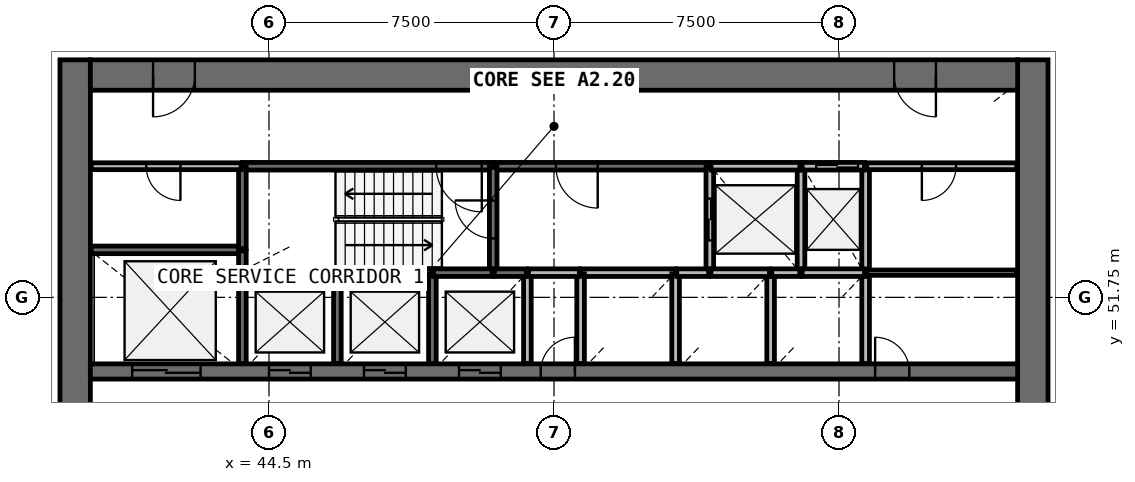
"""IFC4 building model, lengths in metres.
Left out: names, types, materials, properties, quantities, classifications, styles, units other than length and angle.
Written with IfcOpenShell. Run it as: python <this file> out.ifc"""

import sys

from ifc_helpers import new_model, si_unit, direction, frame, frame_2d, origin, place, context, subcontext, project, spatial, rectangle, extrude, source, transform, mapped, element, fill, save


model = new_model("IFC4")
c1 = context("Model", 3, precision=1e-05, world=origin(), true_north=direction((0.0, 1.0)))
c2 = subcontext(c1, "Body", "Model", "MODEL_VIEW")
j1 = project(units=[si_unit("LENGTHUNIT", "METRE"), si_unit("PLANEANGLEUNIT", "RADIAN")], contexts=[c1])
p1 = place(None, origin())
s1 = spatial("IfcSite", under=j1, at=p1, CompositionType="ELEMENT")
p2 = place(p1, origin())
s2 = spatial("IfcBuilding", under=s1, at=p2, CompositionType="ELEMENT")
p3 = place(p2, frame((0.0, 0.0, 83.9)))
s3 = spatial("IfcBuildingStorey", under=s2, at=p3, CompositionType="ELEMENT", Elevation=83.9)
p4 = place(p3, frame((64.6, 38.0, 0.0), z_axis=(0.0, 0.0, 1.0), x_axis=(0.0, 1.0, 0.0)))
e1 = element("IfcWall", 1, at=p4, inside=s3, PredefinedType="SHEAR", context=c2, shape_type="SweptSolid", body=[
    extrude(rectangle(XDim=20.0, YDim=0.8, at=frame_2d((10.0, 0.0))), origin(), (0.0, 0.0, 1.0), 4.1),
])
p5 = place(p4, frame((9.1, 0.0, 0.0)))
e2 = element("IfcOpeningElement", 2, at=p5, cuts=e1, PredefinedType="OPENING", context=c2, shape_type="SweptSolid", body=[
    extrude(rectangle(XDim=1.8, YDim=2.1, at=frame_2d((0.9, 1.05))), frame((0.0, 0.41, 0.0), z_axis=(0.0, -1.0, 0.0), x_axis=(1.0, 0.0, 0.0)), (0.0, 0.0, 1.0), 0.82),
])
p6 = place(p3, frame((39.4, 58.0, 0.0), z_axis=(0.0, 0.0, 1.0), x_axis=(0.0, -1.0, 0.0)))
e3 = element("IfcWall", 3, at=p6, inside=s3, PredefinedType="SHEAR", context=c2, shape_type="SweptSolid", body=[
    extrude(rectangle(XDim=20.0, YDim=0.8, at=frame_2d((10.0, 0.0))), origin(), (0.0, 0.0, 1.0), 4.1),
])
p7 = place(p6, frame((9.1, 0.0, 0.0)))
e4 = element("IfcOpeningElement", 4, at=p7, cuts=e3, PredefinedType="OPENING", context=c2, shape_type="SweptSolid", body=[
    extrude(rectangle(XDim=1.8, YDim=2.1, at=frame_2d((0.9, 1.05))), frame((0.0, 0.41, 0.0), z_axis=(0.0, -1.0, 0.0), x_axis=(1.0, 0.0, 0.0)), (0.0, 0.0, 1.0), 0.82),
])
p8 = place(p3, frame((64.2, 57.6, 0.0), z_axis=(0.0, 0.0, 1.0), x_axis=(-1.0, 0.0, 0.0)))
e5 = element("IfcWall", 5, at=p8, inside=s3, PredefinedType="SHEAR", context=c2, shape_type="SweptSolid", body=[
    extrude(rectangle(XDim=24.4, YDim=0.8, at=frame_2d((12.2, 0.0))), origin(), (0.0, 0.0, 1.0), 4.1),
])
p9 = place(p8, frame((21.65, 0.0, 0.0)))
e6 = element("IfcOpeningElement", 6, at=p9, cuts=e5, PredefinedType="OPENING", context=c2, shape_type="SweptSolid", body=[
    extrude(rectangle(XDim=1.1, YDim=2.1, at=frame_2d((0.55, 1.05))), frame((0.0, 0.41, 0.0), z_axis=(0.0, -1.0, 0.0), x_axis=(1.0, 0.0, 0.0)), (0.0, 0.0, 1.0), 0.82),
])
p10 = place(p8, frame((2.15, 0.0, 0.0)))
e7 = element("IfcOpeningElement", 7, at=p10, cuts=e5, PredefinedType="OPENING", context=c2, shape_type="SweptSolid", body=[
    extrude(rectangle(XDim=1.1, YDim=2.1, at=frame_2d((0.55, 1.05))), frame((0.0, 0.41, 0.0), z_axis=(0.0, -1.0, 0.0), x_axis=(1.0, 0.0, 0.0)), (0.0, 0.0, 1.0), 0.82),
])
p11 = place(p3, frame((39.8, 49.8, 0.0), z_axis=(0.0, 0.0, 1.0), x_axis=(1.0, 0.0, 0.0)))
e8 = element("IfcWall", 8, at=p11, inside=s3, PredefinedType="SHEAR", context=c2, shape_type="SweptSolid", body=[
    extrude(rectangle(XDim=24.4, YDim=0.4, at=frame_2d((12.2, 0.0))), origin(), (0.0, 0.0, 1.0), 4.1),
])
p12 = place(p11, frame((4.7, 0.0, 0.0)))
e9 = element("IfcOpeningElement", 9, at=p12, cuts=e8, PredefinedType="OPENING", context=c2, shape_type="SweptSolid", body=[
    extrude(rectangle(XDim=1.1, YDim=2.1, at=frame_2d((0.55, 1.05))), frame((0.0, 0.21, 0.0), z_axis=(0.0, -1.0, 0.0), x_axis=(1.0, 0.0, 0.0)), (0.0, 0.0, 1.0), 0.42),
])
p13 = place(p11, frame((7.2, 0.0, 0.0)))
e10 = element("IfcOpeningElement", 10, at=p13, cuts=e8, PredefinedType="OPENING", context=c2, shape_type="SweptSolid", body=[
    extrude(rectangle(XDim=1.1, YDim=2.1, at=frame_2d((0.55, 1.05))), frame((0.0, 0.21, 0.0), z_axis=(0.0, -1.0, 0.0), x_axis=(1.0, 0.0, 0.0)), (0.0, 0.0, 1.0), 0.42),
])
p14 = place(p11, frame((9.7, 0.0, 0.0)))
e11 = element("IfcOpeningElement", 11, at=p14, cuts=e8, PredefinedType="OPENING", context=c2, shape_type="SweptSolid", body=[
    extrude(rectangle(XDim=1.1, YDim=2.1, at=frame_2d((0.55, 1.05))), frame((0.0, 0.21, 0.0), z_axis=(0.0, -1.0, 0.0), x_axis=(1.0, 0.0, 0.0)), (0.0, 0.0, 1.0), 0.42),
])
p15 = place(p11, frame((1.1, 0.0, 0.0)))
e12 = element("IfcOpeningElement", 12, at=p15, cuts=e8, PredefinedType="OPENING", context=c2, shape_type="SweptSolid", body=[
    extrude(rectangle(XDim=1.8, YDim=2.4, at=frame_2d((0.9, 1.2))), frame((0.0, 0.21, 0.0), z_axis=(0.0, -1.0, 0.0), x_axis=(1.0, 0.0, 0.0)), (0.0, 0.0, 1.0), 0.42),
])
p16 = place(p11, frame((20.65, 0.0, 0.0)))
e13 = element("IfcOpeningElement", 13, at=p16, cuts=e8, PredefinedType="OPENING", context=c2, shape_type="SweptSolid", body=[
    extrude(rectangle(XDim=0.9, YDim=2.1, at=frame_2d((0.45, 1.05))), frame((0.0, 0.21, 0.0), z_axis=(0.0, -1.0, 0.0), x_axis=(1.0, 0.0, 0.0)), (0.0, 0.0, 1.0), 0.42),
])
p17 = place(p11, frame((11.85, 0.0, 0.0)))
e14 = element("IfcOpeningElement", 14, at=p17, cuts=e8, PredefinedType="OPENING", context=c2, shape_type="SweptSolid", body=[
    extrude(rectangle(XDim=0.9, YDim=2.1, at=frame_2d((0.45, 1.05))), frame((0.0, 0.21, 0.0), z_axis=(0.0, -1.0, 0.0), x_axis=(1.0, 0.0, 0.0)), (0.0, 0.0, 1.0), 0.42),
])
p18 = place(p3, frame((50.4, 55.2, 0.0), z_axis=(0.0, 0.0, 1.0), x_axis=(-1.0, 0.0, 0.0)))
e15 = element("IfcWall", 15, at=p18, inside=s3, PredefinedType="SOLIDWALL", context=c2, shape_type="SweptSolid", body=[
    extrude(rectangle(XDim=6.6, YDim=0.2, at=frame_2d((3.3, 0.0))), origin(), (0.0, 0.0, 1.0), 3.7),
])
p19 = place(p18, frame((0.3, 0.0, 0.0)))
e16 = element("IfcOpeningElement", 16, at=p19, cuts=e15, PredefinedType="OPENING", context=c2, shape_type="SweptSolid", body=[
    extrude(rectangle(XDim=1.2, YDim=2.1, at=frame_2d((0.6, 1.05))), frame((0.0, 0.11, 0.0), z_axis=(0.0, -1.0, 0.0), x_axis=(1.0, 0.0, 0.0)), (0.0, 0.0, 1.0), 0.22),
])
p20 = place(p3, frame((56.1, 55.2, 0.0), z_axis=(0.0, 0.0, 1.0), x_axis=(-1.0, 0.0, 0.0)))
e17 = element("IfcWall", 17, at=p20, inside=s3, PredefinedType="SOLIDWALL", context=c2, shape_type="SweptSolid", body=[
    extrude(rectangle(XDim=5.67, YDim=0.2, at=frame_2d((2.835, 0.0))), origin(), (0.0, 0.0, 1.0), 3.7),
])
p21 = place(p20, frame((2.95, 0.0, 0.0)))
e18 = element("IfcOpeningElement", 18, at=p21, cuts=e17, PredefinedType="OPENING", context=c2, shape_type="SweptSolid", body=[
    extrude(rectangle(XDim=1.1, YDim=2.1, at=frame_2d((0.55, 1.05))), frame((0.0, 0.11, 0.0), z_axis=(0.0, -1.0, 0.0), x_axis=(1.0, 0.0, 0.0)), (0.0, 0.0, 1.0), 0.22),
])
p22 = place(p3, frame((43.8, 53.0, 0.0), z_axis=(0.0, 0.0, 1.0), x_axis=(-1.0, 0.0, 0.0)))
e19 = element("IfcWall", 19, at=p22, inside=s3, PredefinedType="SOLIDWALL", context=c2, shape_type="SweptSolid", body=[
    extrude(rectangle(XDim=3.98, YDim=0.2, at=frame_2d((1.99, 0.0))), origin(), (0.0, 0.0, 1.0), 3.7),
])
p23 = place(p3, frame((50.4, 52.4, 0.0), z_axis=(0.0, 0.0, 1.0), x_axis=(0.0, 1.0, 0.0)))
e20 = element("IfcWall", 20, at=p23, inside=s3, PredefinedType="SOLIDWALL", context=c2, shape_type="SweptSolid", body=[
    extrude(rectangle(XDim=2.77, YDim=0.2, at=frame_2d((1.385, 0.0))), origin(), (0.0, 0.0, 1.0), 3.7),
])
p24 = place(p23, frame((0.9, 0.0, 0.0)))
e21 = element("IfcOpeningElement", 21, at=p24, cuts=e20, PredefinedType="OPENING", context=c2, shape_type="SweptSolid", body=[
    extrude(rectangle(XDim=1.0, YDim=2.1, at=frame_2d((0.5, 1.05))), frame((0.0, 0.11, 0.0), z_axis=(0.0, -1.0, 0.0), x_axis=(1.0, 0.0, 0.0)), (0.0, 0.0, 1.0), 0.22),
])
p25 = place(p3, frame((56.1, 55.17, 0.0), z_axis=(0.0, 0.0, 1.0), x_axis=(0.0, -1.0, 0.0)))
e22 = element("IfcWall", 22, at=p25, inside=s3, PredefinedType="SOLIDWALL", context=c2, shape_type="SweptSolid", body=[
    extrude(rectangle(XDim=2.77, YDim=0.2, at=frame_2d((1.385, 0.0))), origin(), (0.0, 0.0, 1.0), 3.7),
])
p26 = place(p25, frame((0.82, 0.0, 0.0)))
e23 = element("IfcOpeningElement", 23, at=p26, cuts=e22, PredefinedType="OPENING", context=c2, shape_type="SweptSolid", body=[
    extrude(rectangle(XDim=1.1, YDim=2.1, at=frame_2d((0.55, 1.05))), frame((0.0, 0.11, 0.0), z_axis=(0.0, -1.0, 0.0), x_axis=(1.0, 0.0, 0.0)), (0.0, 0.0, 1.0), 0.22),
])
for number, where, z_axis, x_axis in (
    (24, (58.5, 52.4, 0.0), (0.0, 0.0, 1.0), (0.0, 1.0, 0.0)),
    (25, (60.2, 52.4, 0.0), (0.0, 0.0, 1.0), (0.0, 1.0, 0.0)),
):
    element("IfcWall", number, at=place(p3, frame(where, z_axis=z_axis, x_axis=x_axis)), inside=s3, PredefinedType="SOLIDWALL", context=c2, shape_type="SweptSolid", body=[
        extrude(rectangle(XDim=2.8, YDim=0.2, at=frame_2d((1.4, 0.0))), origin(), (0.0, 0.0, 1.0), 3.7),
    ])
p27 = place(p3, frame((46.3, 52.4, 0.0), z_axis=(0.0, 0.0, 1.0), x_axis=(-1.0, 0.0, 0.0)))
e26 = element("IfcWall", 26, at=p27, inside=s3, PredefinedType="SOLIDWALL", context=c2, shape_type="SweptSolid", body=[
    extrude(rectangle(XDim=2.5, YDim=0.2, at=frame_2d((1.25, 0.0))), origin(), (0.0, 0.0, 1.0), 3.7),
])
p28 = place(p3, frame((48.8, 52.4, 0.0), z_axis=(0.0, 0.0, 1.0), x_axis=(-1.0, 0.0, 0.0)))
e27 = element("IfcWall", 27, at=p28, inside=s3, PredefinedType="SOLIDWALL", context=c2, shape_type="SweptSolid", body=[
    extrude(rectangle(XDim=2.47, YDim=0.2, at=frame_2d((1.235, 0.0))), origin(), (0.0, 0.0, 1.0), 3.7),
])
p29 = place(p3, frame((55.2, 52.4, 0.0), z_axis=(0.0, 0.0, 1.0), x_axis=(-1.0, 0.0, 0.0)))
e28 = element("IfcWall", 28, at=p29, inside=s3, PredefinedType="SOLIDWALL", context=c2, shape_type="SweptSolid", body=[
    extrude(rectangle(XDim=2.5, YDim=0.2, at=frame_2d((1.25, 0.0))), origin(), (0.0, 0.0, 1.0), 3.7),
])
p30 = place(p3, frame((58.47, 55.2, 0.0), z_axis=(0.0, 0.0, 1.0), x_axis=(-1.0, 0.0, 0.0)))
e29 = element("IfcWall", 29, at=p30, inside=s3, PredefinedType="SOLIDWALL", context=c2, shape_type="SweptSolid", body=[
    extrude(rectangle(XDim=2.34, YDim=0.2, at=frame_2d((1.17, 0.0))), origin(), (0.0, 0.0, 1.0), 3.7),
])
for number, where, z_axis, x_axis in (
    (30, (43.8, 52.37, 0.0), (0.0, 0.0, 1.0), (0.0, -1.0, 0.0)),
    (31, (46.3, 50.01, 0.0), (0.0, 0.0, 1.0), (0.0, 1.0, 0.0)),
    (32, (48.8, 50.01, 0.0), (0.0, 0.0, 1.0), (0.0, 1.0, 0.0)),
):
    element("IfcWall", number, at=place(p3, frame(where, z_axis=z_axis, x_axis=x_axis)), inside=s3, PredefinedType="SOLIDWALL", context=c2, shape_type="SweptSolid", body=[
        extrude(rectangle(XDim=2.36, YDim=0.2, at=frame_2d((1.18, 0.0))), origin(), (0.0, 0.0, 1.0), 3.7),
    ])
p31 = place(p3, frame((51.3, 50.01, 0.0), z_axis=(0.0, 0.0, 1.0), x_axis=(0.0, 1.0, 0.0)))
e33 = element("IfcWall", 33, at=p31, inside=s3, PredefinedType="SOLIDWALL", context=c2, shape_type="SweptSolid", body=[
    extrude(rectangle(XDim=2.39, YDim=0.2, at=frame_2d((1.195, 0.0))), origin(), (0.0, 0.0, 1.0), 3.7),
])
for number, where, z_axis, x_axis in (
    (34, (52.7, 52.37, 0.0), (0.0, 0.0, 1.0), (0.0, -1.0, 0.0)),
    (35, (55.2, 50.01, 0.0), (0.0, 0.0, 1.0), (0.0, 1.0, 0.0)),
):
    element("IfcWall", number, at=place(p3, frame(where, z_axis=z_axis, x_axis=x_axis)), inside=s3, PredefinedType="SOLIDWALL", context=c2, shape_type="SweptSolid", body=[
        extrude(rectangle(XDim=2.36, YDim=0.2, at=frame_2d((1.18, 0.0))), origin(), (0.0, 0.0, 1.0), 3.7),
    ])
p32 = place(p3, frame((57.7, 50.01, 0.0), z_axis=(0.0, 0.0, 1.0), x_axis=(0.0, 1.0, 0.0)))
e36 = element("IfcWall", 36, at=p32, inside=s3, PredefinedType="SOLIDWALL", context=c2, shape_type="SweptSolid", body=[
    extrude(rectangle(XDim=2.39, YDim=0.2, at=frame_2d((1.195, 0.0))), origin(), (0.0, 0.0, 1.0), 3.7),
])
p33 = place(p3, frame((60.2, 50.01, 0.0), z_axis=(0.0, 0.0, 1.0), x_axis=(0.0, 1.0, 0.0)))
e37 = element("IfcWall", 37, at=p33, inside=s3, PredefinedType="SOLIDWALL", context=c2, shape_type="SweptSolid", body=[
    extrude(rectangle(XDim=2.36, YDim=0.2, at=frame_2d((1.18, 0.0))), origin(), (0.0, 0.0, 1.0), 3.7),
])
p34 = place(p3, frame((43.8, 55.17, 0.0), z_axis=(0.0, 0.0, 1.0), x_axis=(0.0, -1.0, 0.0)))
e38 = element("IfcWall", 38, at=p34, inside=s3, PredefinedType="SOLIDWALL", context=c2, shape_type="SweptSolid", body=[
    extrude(rectangle(XDim=2.14, YDim=0.2, at=frame_2d((1.07, 0.0))), origin(), (0.0, 0.0, 1.0), 3.7),
])
p35 = place(p3, frame((60.17, 52.4, 0.0), z_axis=(0.0, 0.0, 1.0), x_axis=(-1.0, 0.0, 0.0)))
e39 = element("IfcWall", 39, at=p35, inside=s3, PredefinedType="SOLIDWALL", context=c2, shape_type="SweptSolid", body=[
    extrude(rectangle(XDim=1.64, YDim=0.2, at=frame_2d((0.82, 0.0))), origin(), (0.0, 0.0, 1.0), 3.7),
])
p36 = place(p3, frame((60.17, 55.2, 0.0), z_axis=(0.0, 0.0, 1.0), x_axis=(-1.0, 0.0, 0.0)))
e40 = element("IfcWall", 40, at=p36, inside=s3, PredefinedType="SOLIDWALL", context=c2, shape_type="SweptSolid", body=[
    extrude(rectangle(XDim=1.64, YDim=0.2, at=frame_2d((0.82, 0.0))), origin(), (0.0, 0.0, 1.0), 3.7),
])
p37 = place(p36, frame((0.17, 0.0, 0.0)))
e41 = element("IfcOpeningElement", 41, at=p37, cuts=e40, PredefinedType="OPENING", context=c2, shape_type="SweptSolid", body=[
    extrude(rectangle(XDim=1.1, YDim=2.1, at=frame_2d((0.55, 1.05))), frame((0.0, 0.11, 0.0), z_axis=(0.0, -1.0, 0.0), x_axis=(1.0, 0.0, 0.0)), (0.0, 0.0, 1.0), 0.22),
])
for number, where, z_axis, x_axis in (
    (42, (50.37, 52.4, 0.0), (0.0, 0.0, 1.0), (-1.0, 0.0, 0.0)),
    (43, (57.67, 52.4, 0.0), (0.0, 0.0, 1.0), (-1.0, 0.0, 0.0)),
):
    element("IfcWall", number, at=place(p3, frame(where, z_axis=z_axis, x_axis=x_axis)), inside=s3, PredefinedType="SOLIDWALL", context=c2, shape_type="SweptSolid", body=[
        extrude(rectangle(XDim=1.54, YDim=0.2, at=frame_2d((0.77, 0.0))), origin(), (0.0, 0.0, 1.0), 3.7),
    ])
p38 = place(p3, frame((51.33, 52.4, 0.0), z_axis=(0.0, 0.0, 1.0), x_axis=(1.0, 0.0, 0.0)))
e44 = element("IfcWall", 44, at=p38, inside=s3, PredefinedType="SOLIDWALL", context=c2, shape_type="SweptSolid", body=[
    extrude(rectangle(XDim=1.34, YDim=0.2, at=frame_2d((0.67, 0.0))), origin(), (0.0, 0.0, 1.0), 3.7),
])
for number, where, z_axis, x_axis in (
    (45, (51.27, 52.4, 0.0), (0.0, 0.0, 1.0), (-1.0, 0.0, 0.0)),
    (46, (56.07, 52.4, 0.0), (0.0, 0.0, 1.0), (-1.0, 0.0, 0.0)),
):
    element("IfcWall", number, at=place(p3, frame(where, z_axis=z_axis, x_axis=x_axis)), inside=s3, PredefinedType="SOLIDWALL", context=c2, shape_type="SweptSolid", body=[
        extrude(rectangle(XDim=0.84, YDim=0.2, at=frame_2d((0.42, 0.0))), origin(), (0.0, 0.0, 1.0), 3.7),
    ])
p39 = place(p3, frame((58.47, 52.4, 0.0), z_axis=(0.0, 0.0, 1.0), x_axis=(-1.0, 0.0, 0.0)))
e47 = element("IfcWall", 47, at=p39, inside=s3, PredefinedType="SOLIDWALL", context=c2, shape_type="SweptSolid", body=[
    extrude(rectangle(XDim=0.74, YDim=0.2, at=frame_2d((0.37, 0.0))), origin(), (0.0, 0.0, 1.0), 3.7),
])
p40 = place(p3, frame((43.8, 52.43, 0.0), z_axis=(0.0, 0.0, 1.0), x_axis=(0.0, 1.0, 0.0)))
e48 = element("IfcWall", 48, at=p40, inside=s3, PredefinedType="SOLIDWALL", context=c2, shape_type="SweptSolid", body=[
    extrude(rectangle(XDim=0.54, YDim=0.2, at=frame_2d((0.27, 0.0))), origin(), (0.0, 0.0, 1.0), 3.7),
])
p41 = place(p3, frame((64.18, 55.2, 0.0), z_axis=(0.0, 0.0, 1.0), x_axis=(-1.0, 0.0, 0.0)))
e49 = element("IfcWall", 49, at=p41, inside=s3, PredefinedType="PARTITIONING", context=c2, shape_type="SweptSolid", body=[
    extrude(rectangle(XDim=3.95, YDim=0.18, at=frame_2d((1.975, 0.0))), origin(), (0.0, 0.0, 1.0), 3.7),
])
p42 = place(p41, frame((1.6, 0.0, 0.0)))
e50 = element("IfcOpeningElement", 50, at=p42, cuts=e49, PredefinedType="OPENING", context=c2, shape_type="SweptSolid", body=[
    extrude(rectangle(XDim=0.9, YDim=2.1, at=frame_2d((0.45, 1.05))), frame((0.0, 0.1, 0.0), z_axis=(0.0, -1.0, 0.0), x_axis=(1.0, 0.0, 0.0)), (0.0, 0.0, 1.0), 0.2),
])
p43 = place(p3, frame((43.77, 55.2, 0.0), z_axis=(0.0, 0.0, 1.0), x_axis=(-1.0, 0.0, 0.0)))
e51 = element("IfcWall", 51, at=p43, inside=s3, PredefinedType="PARTITIONING", context=c2, shape_type="SweptSolid", body=[
    extrude(rectangle(XDim=3.95, YDim=0.18, at=frame_2d((1.975, 0.0))), origin(), (0.0, 0.0, 1.0), 3.7),
])
p44 = place(p43, frame((1.6, 0.0, 0.0)))
e52 = element("IfcOpeningElement", 52, at=p44, cuts=e51, PredefinedType="OPENING", context=c2, shape_type="SweptSolid", body=[
    extrude(rectangle(XDim=0.9, YDim=2.1, at=frame_2d((0.45, 1.05))), frame((0.0, 0.1, 0.0), z_axis=(0.0, -1.0, 0.0), x_axis=(1.0, 0.0, 0.0)), (0.0, 0.0, 1.0), 0.2),
])
p45 = place(p3, frame((64.18, 52.4, 0.0), z_axis=(0.0, 0.0, 1.0), x_axis=(-1.0, 0.0, 0.0)))
e53 = element("IfcWall", 53, at=p45, inside=s3, PredefinedType="PARTITIONING", context=c2, shape_type="SweptSolid", body=[
    extrude(rectangle(XDim=3.95, YDim=0.14, at=frame_2d((1.975, 0.0))), origin(), (0.0, 0.0, 1.0), 2.9),
])
m1 = source(origin(), c2, "Body", "SweptSolid", [
    extrude(rectangle(XDim=1.1, YDim=2.1, at=frame_2d((0.55, 1.05))), frame((0.0, 0.025, 0.0), z_axis=(0.0, -1.0, 0.0), x_axis=(1.0, 0.0, 0.0)), (0.0, 0.0, 1.0), 0.05),
])
p46 = place(p12, origin())
e54 = element("IfcDoor", 54, at=p46, inside=s3, OperationType="DOUBLE_DOOR_SLIDING", PredefinedType="USERDEFINED", context=c2, shape_type="MappedRepresentation", body=[
    mapped(m1, transform((0.0, 0.0, 0.0), scale=1.0)),
])
fill(e9, e54)
p47 = place(p13, origin())
e55 = element("IfcDoor", 55, at=p47, inside=s3, OperationType="DOUBLE_DOOR_SLIDING", PredefinedType="USERDEFINED", context=c2, shape_type="MappedRepresentation", body=[
    mapped(m1, transform((0.0, 0.0, 0.0), scale=1.0)),
])
fill(e10, e55)
p48 = place(p14, origin())
e56 = element("IfcDoor", 56, at=p48, inside=s3, OperationType="DOUBLE_DOOR_SLIDING", PredefinedType="USERDEFINED", context=c2, shape_type="MappedRepresentation", body=[
    mapped(m1, transform((0.0, 0.0, 0.0), scale=1.0)),
])
fill(e11, e56)
p49 = place(p26, origin())
e57 = element("IfcDoor", 57, at=p49, inside=s3, OperationType="DOUBLE_DOOR_SLIDING", PredefinedType="USERDEFINED", context=c2, shape_type="MappedRepresentation", body=[
    mapped(m1, transform((0.0, 0.0, 0.0), scale=1.0)),
])
fill(e23, e57)
p50 = place(p37, origin())
e58 = element("IfcDoor", 58, at=p50, inside=s3, OperationType="DOUBLE_DOOR_SLIDING", PredefinedType="USERDEFINED", context=c2, shape_type="MappedRepresentation", body=[
    mapped(m1, transform((0.0, 0.0, 0.0), scale=1.0)),
])
fill(e41, e58)
m2 = source(origin(), c2, "Body", "SweptSolid", [
    extrude(rectangle(XDim=1.8, YDim=2.4, at=frame_2d((0.9, 1.2))), frame((0.0, 0.025, 0.0), z_axis=(0.0, -1.0, 0.0), x_axis=(1.0, 0.0, 0.0)), (0.0, 0.0, 1.0), 0.05),
])
p51 = place(p15, origin())
e59 = element("IfcDoor", 59, at=p51, inside=s3, OperationType="DOUBLE_DOOR_SLIDING", PredefinedType="USERDEFINED", context=c2, shape_type="MappedRepresentation", body=[
    mapped(m2, transform((0.0, 0.0, 0.0), scale=1.0)),
])
fill(e12, e59)
m3 = source(origin(), c2, "Body", "SweptSolid", [
    extrude(rectangle(XDim=1.2, YDim=2.1, at=frame_2d((0.6, 1.05))), frame((0.0, 0.025, 0.0), z_axis=(0.0, -1.0, 0.0), x_axis=(1.0, 0.0, 0.0)), (0.0, 0.0, 1.0), 0.05),
])
p52 = place(p19, origin())
e60 = element("IfcDoor", 60, at=p52, inside=s3, OperationType="SINGLE_SWING_LEFT", PredefinedType="DOOR", context=c2, shape_type="MappedRepresentation", body=[
    mapped(m3, transform((0.0, 0.0, 0.0), scale=1.0)),
])
fill(e16, e60)
m4 = source(origin(), c2, "Body", "SweptSolid", [
    extrude(rectangle(XDim=1.0, YDim=2.1, at=frame_2d((0.5, 1.05))), frame((0.0, 0.025, 0.0), z_axis=(0.0, -1.0, 0.0), x_axis=(1.0, 0.0, 0.0)), (0.0, 0.0, 1.0), 0.05),
])
p53 = place(p24, origin())
e61 = element("IfcDoor", 61, at=p53, inside=s3, OperationType="SINGLE_SWING_RIGHT", PredefinedType="DOOR", context=c2, shape_type="MappedRepresentation", body=[
    mapped(m4, transform((0.0, 0.0, 0.0), scale=1.0)),
])
fill(e21, e61)
m5 = source(origin(), c2, "Body", "SweptSolid", [
    extrude(rectangle(XDim=1.1, YDim=2.1, at=frame_2d((0.55, 1.05))), frame((0.0, 0.025, 0.0), z_axis=(0.0, -1.0, 0.0), x_axis=(1.0, 0.0, 0.0)), (0.0, 0.0, 1.0), 0.05),
])
p54 = place(p21, origin())
e62 = element("IfcDoor", 62, at=p54, inside=s3, OperationType="SINGLE_SWING_LEFT", PredefinedType="DOOR", context=c2, shape_type="MappedRepresentation", body=[
    mapped(m5, transform((0.0, 0.0, 0.0), scale=1.0)),
])
fill(e18, e62)
m6 = source(origin(), c2, "Body", "SweptSolid", [
    extrude(rectangle(XDim=1.1, YDim=2.1, at=frame_2d((0.55, 1.05))), frame((0.0, 0.025, 0.0), z_axis=(0.0, -1.0, 0.0), x_axis=(1.0, 0.0, 0.0)), (0.0, 0.0, 1.0), 0.05),
])
p55 = place(p9, origin())
e63 = element("IfcDoor", 63, at=p55, inside=s3, OperationType="SINGLE_SWING_RIGHT", PredefinedType="DOOR", context=c2, shape_type="MappedRepresentation", body=[
    mapped(m6, transform((0.0, 0.0, 0.0), scale=1.0)),
])
fill(e6, e63)
p56 = place(p10, origin())
e64 = element("IfcDoor", 64, at=p56, inside=s3, OperationType="SINGLE_SWING_LEFT", PredefinedType="DOOR", context=c2, shape_type="MappedRepresentation", body=[
    mapped(m6, transform((0.0, 0.0, 0.0), scale=1.0)),
])
fill(e7, e64)
m7 = source(origin(), c2, "Body", "SweptSolid", [
    extrude(rectangle(XDim=0.9, YDim=2.1, at=frame_2d((0.45, 1.05))), frame((0.0, 0.025, 0.0), z_axis=(0.0, -1.0, 0.0), x_axis=(1.0, 0.0, 0.0)), (0.0, 0.0, 1.0), 0.05),
])
p57 = place(p44, origin())
e65 = element("IfcDoor", 65, at=p57, inside=s3, OperationType="SINGLE_SWING_LEFT", PredefinedType="DOOR", context=c2, shape_type="MappedRepresentation", body=[
    mapped(m7, transform((0.0, 0.0, 0.0), scale=1.0)),
])
fill(e52, e65)
p58 = place(p16, origin())
e66 = element("IfcDoor", 66, at=p58, inside=s3, OperationType="SINGLE_SWING_LEFT", PredefinedType="DOOR", context=c2, shape_type="MappedRepresentation", body=[
    mapped(m7, transform((0.0, 0.0, 0.0), scale=1.0)),
])
fill(e13, e66)
p59 = place(p42, origin())
e67 = element("IfcDoor", 67, at=p59, inside=s3, OperationType="SINGLE_SWING_RIGHT", PredefinedType="DOOR", context=c2, shape_type="MappedRepresentation", body=[
    mapped(m7, transform((0.0, 0.0, 0.0), scale=1.0)),
])
fill(e50, e67)
p60 = place(p17, origin())
e68 = element("IfcDoor", 68, at=p60, inside=s3, OperationType="SINGLE_SWING_RIGHT", PredefinedType="DOOR", context=c2, shape_type="MappedRepresentation", body=[
    mapped(m7, transform((0.0, 0.0, 0.0), scale=1.0)),
])
fill(e14, e68)
save(model, sys.argv[1])
